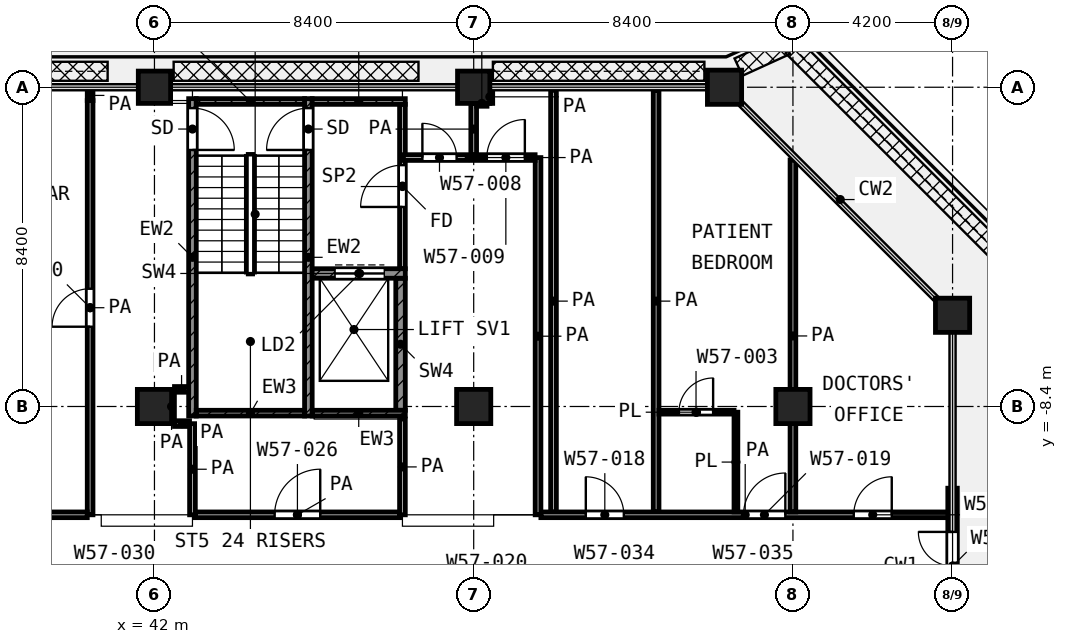
"""IFC4 building model, lengths in metres.
Left out: names, types, materials, properties, quantities, classifications, styles, units other than length and angle.
Written with IfcOpenShell. Run it as: python <this file> out.ifc"""

import sys

from ifc_helpers import new_model, si_unit, direction, frame, frame_2d, origin, origin_2d, place, context, subcontext, project, spatial, rectangle, extrude, element, fill, save


model = new_model("IFC4")
c1 = context("Model", 3, precision=1e-05, world=origin(), true_north=direction((0.0, 1.0)))
c2 = subcontext(c1, "Body", "Model", "MODEL_VIEW")
j1 = project(units=[si_unit("LENGTHUNIT", "METRE"), si_unit("PLANEANGLEUNIT", "RADIAN")], contexts=[c1])
p1 = place(None, origin())
s1 = spatial("IfcSite", under=j1, at=p1, CompositionType="ELEMENT")
p2 = place(p1, origin())
s2 = spatial("IfcBuilding", under=s1, at=p2, CompositionType="ELEMENT")
p3 = place(p2, frame((0.0, 0.0, 268.4)))
s3 = spatial("IfcBuildingStorey", under=s2, at=p3, CompositionType="ELEMENT", Elevation=268.4)
for number, where, z_axis, x_axis in (
    (1, (42.0, 0.0, 0.0), (0.0, 0.0, 1.0), (1.0, 0.0, 0.0)),
    (2, (50.4, 0.0, 0.0), (0.0, 0.0, 1.0), (1.0, 0.0, 0.0)),
):
    element("IfcColumn", number, at=place(p3, frame(where, z_axis=z_axis, x_axis=x_axis)), inside=s3, PredefinedType="COLUMN", context=c2, shape_type="SweptSolid", body=[
        extrude(rectangle(XDim=0.85, YDim=0.85, at=origin_2d()), origin(), (0.0, 0.0, 1.0), 4.2),
    ])
for number, where, z_axis, x_axis in (
    (3, (57.0, 0.0, 0.0), (0.0, 0.0, 1.0), (1.0, 0.0, 0.0)),
    (4, (63.0, -6.0, 0.0), (0.0, 0.0, 1.0), (1.0, 0.0, 0.0)),
    (5, (42.0, -8.4, 0.0), (0.0, 0.0, 1.0), (1.0, 0.0, 0.0)),
    (6, (50.4, -8.4, 0.0), (0.0, 0.0, 1.0), (1.0, 0.0, 0.0)),
    (7, (58.8, -8.4, 0.0), (0.0, 0.0, 1.0), (1.0, 0.0, 0.0)),
):
    element("IfcColumn", number, at=place(p3, frame(where, z_axis=z_axis, x_axis=x_axis)), inside=s3, PredefinedType="COLUMN", context=c2, shape_type="SweptSolid", body=[
        extrude(rectangle(XDim=0.9, YDim=0.9, at=origin_2d()), origin(), (0.0, 0.0, 1.0), 4.2),
    ])
p4 = place(p3, frame((63.0, -14.65, 0.0), z_axis=(0.0, 0.0, 1.0), x_axis=(0.0, 1.0, 0.0)))
e8 = element("IfcWall", 8, at=p4, inside=s3, PredefinedType="SOLIDWALL", context=c2, shape_type="SweptSolid", body=[
    extrude(rectangle(XDim=4.1, YDim=0.25, at=frame_2d((2.05, 0.0))), origin(), (0.0, 0.0, 1.0), 3.58),
])
p5 = place(p4, frame((1.15, 0.0, 0.0)))
e9 = element("IfcOpeningElement", 9, at=p5, cuts=e8, PredefinedType="OPENING", context=c2, shape_type="SweptSolid", body=[
    extrude(rectangle(XDim=1.8, YDim=2.1, at=frame_2d((0.9, 1.05))), frame((0.0, 0.135, 0.0), z_axis=(0.0, -1.0, 0.0), x_axis=(1.0, 0.0, 0.0)), (0.0, 0.0, 1.0), 0.27),
])
p6 = place(p3, frame((43.0, -8.65, 0.0), z_axis=(0.0, 0.0, 1.0), x_axis=(0.0, 1.0, 0.0)))
e10 = element("IfcWall", 10, at=p6, inside=s3, PredefinedType="SHEAR", context=c2, shape_type="SweptSolid", body=[
    extrude(rectangle(XDim=8.35, YDim=0.2, at=frame_2d((4.175, 0.0))), origin(), (0.0, 0.0, 1.0), 3.7),
])
p7 = place(p6, frame((7.0, 0.0, 0.0)))
e11 = element("IfcOpeningElement", 11, at=p7, cuts=e10, PredefinedType="OPENING", context=c2, shape_type="SweptSolid", body=[
    extrude(rectangle(XDim=1.1, YDim=2.1, at=frame_2d((0.55, 1.05))), frame((0.0, 0.11, 0.0), z_axis=(0.0, -1.0, 0.0), x_axis=(1.0, 0.0, 0.0)), (0.0, 0.0, 1.0), 0.22),
])
p8 = place(p3, frame((46.05, -8.65, 0.0), z_axis=(0.0, 0.0, 1.0), x_axis=(0.0, 1.0, 0.0)))
e12 = element("IfcWall", 12, at=p8, inside=s3, PredefinedType="SHEAR", context=c2, shape_type="SweptSolid", body=[
    extrude(rectangle(XDim=8.35, YDim=0.2, at=frame_2d((4.175, 0.0))), origin(), (0.0, 0.0, 1.0), 3.7),
])
p9 = place(p8, frame((7.0, 0.0, 0.0)))
e13 = element("IfcOpeningElement", 13, at=p9, cuts=e12, PredefinedType="OPENING", context=c2, shape_type="SweptSolid", body=[
    extrude(rectangle(XDim=1.1, YDim=2.1, at=frame_2d((0.55, 1.05))), frame((0.0, 0.11, 0.0), z_axis=(0.0, -1.0, 0.0), x_axis=(1.0, 0.0, 0.0)), (0.0, 0.0, 1.0), 0.22),
])
p10 = place(p3, frame((43.1, -0.375, 0.0), z_axis=(0.0, 0.0, 1.0), x_axis=(1.0, 0.0, 0.0)))
e14 = element("IfcWall", 14, at=p10, inside=s3, PredefinedType="SHEAR", context=c2, shape_type="SweptSolid", body=[
    extrude(rectangle(XDim=2.85, YDim=0.15, at=frame_2d((1.425, 0.0))), origin(), (0.0, 0.0, 1.0), 3.7),
])
p11 = place(p3, frame((46.15, -0.375, 0.0), z_axis=(0.0, 0.0, 1.0), x_axis=(1.0, 0.0, 0.0)))
e15 = element("IfcWall", 15, at=p11, inside=s3, PredefinedType="SHEAR", context=c2, shape_type="SweptSolid", body=[
    extrude(rectangle(XDim=2.45, YDim=0.15, at=frame_2d((1.225, 0.0))), origin(), (0.0, 0.0, 1.0), 3.7),
])
p12 = place(p3, frame((43.1, -8.575, 0.0), z_axis=(0.0, 0.0, 1.0), x_axis=(1.0, 0.0, 0.0)))
e16 = element("IfcWall", 16, at=p12, inside=s3, PredefinedType="SHEAR", context=c2, shape_type="SweptSolid", body=[
    extrude(rectangle(XDim=2.85, YDim=0.15, at=frame_2d((1.425, 0.0))), origin(), (0.0, 0.0, 1.0), 3.7),
])
p13 = place(p3, frame((46.15, -8.575, 0.0), z_axis=(0.0, 0.0, 1.0), x_axis=(1.0, 0.0, 0.0)))
e17 = element("IfcWall", 17, at=p13, inside=s3, PredefinedType="SHEAR", context=c2, shape_type="SweptSolid", body=[
    extrude(rectangle(XDim=2.45, YDim=0.15, at=frame_2d((1.225, 0.0))), origin(), (0.0, 0.0, 1.0), 3.7),
])
p14 = place(p3, frame((46.15, -4.9, 0.0), z_axis=(0.0, 0.0, 1.0), x_axis=(1.0, 0.0, 0.0)))
e18 = element("IfcWall", 18, at=p14, inside=s3, PredefinedType="SHEAR", context=c2, shape_type="SweptSolid", body=[
    extrude(rectangle(XDim=2.45, YDim=0.25, at=frame_2d((1.225, 0.0))), origin(), (0.0, 0.0, 1.0), 3.7),
])
p15 = place(p14, frame((0.6, 0.0, 0.0)))
e19 = element("IfcOpeningElement", 19, at=p15, cuts=e18, PredefinedType="OPENING", context=c2, shape_type="SweptSolid", body=[
    extrude(rectangle(XDim=1.3, YDim=2.1, at=frame_2d((0.65, 1.05))), frame((0.0, 0.135, 0.0), z_axis=(0.0, -1.0, 0.0), x_axis=(1.0, 0.0, 0.0)), (0.0, 0.0, 1.0), 0.27),
])
p16 = place(p3, frame((48.475, -8.5, 0.0), z_axis=(0.0, 0.0, 1.0), x_axis=(0.0, 1.0, 0.0)))
e20 = element("IfcWall", 20, at=p16, inside=s3, PredefinedType="SHEAR", context=c2, shape_type="SweptSolid", body=[
    extrude(rectangle(XDim=3.475, YDim=0.25, at=frame_2d((1.738, 0.0))), origin(), (0.0, 0.0, 1.0), 3.7),
])
p17 = place(p3, frame((48.525, -4.775, 0.0), z_axis=(0.0, 0.0, 1.0), x_axis=(0.0, 1.0, 0.0)))
e21 = element("IfcWall", 21, at=p17, inside=s3, PredefinedType="PARTITIONING", context=c2, shape_type="SweptSolid", body=[
    extrude(rectangle(XDim=4.325, YDim=0.15, at=frame_2d((2.163, 0.0))), origin(), (0.0, 0.0, 1.0), 3.7),
])
p18 = place(p17, frame((1.625, 0.0, 0.0)))
e22 = element("IfcOpeningElement", 22, at=p18, cuts=e21, PredefinedType="OPENING", context=c2, shape_type="SweptSolid", body=[
    extrude(rectangle(XDim=1.1, YDim=2.1, at=frame_2d((0.55, 1.05))), frame((0.0, 0.085, 0.0), z_axis=(0.0, -1.0, 0.0), x_axis=(1.0, 0.0, 0.0)), (0.0, 0.0, 1.0), 0.17),
])
p19 = place(p3, frame((55.275, -8.55, 0.0), z_axis=(0.0, 0.0, 1.0), x_axis=(1.0, 0.0, 0.0)))
e23 = element("IfcWall", 23, at=p19, inside=s3, PredefinedType="PARTITIONING", context=c2, shape_type="SweptSolid", body=[
    extrude(rectangle(XDim=1.975, YDim=0.1, at=frame_2d((0.988, 0.0))), origin(), (0.0, 0.0, 1.0), 3.7),
])
p20 = place(p19, frame((0.525, 0.0, 0.0)))
e24 = element("IfcOpeningElement", 24, at=p20, cuts=e23, PredefinedType="OPENING", context=c2, shape_type="SweptSolid", body=[
    extrude(rectangle(XDim=0.9, YDim=2.1, at=frame_2d((0.45, 1.05))), frame((0.0, 0.06, 0.0), z_axis=(0.0, -1.0, 0.0), x_axis=(1.0, 0.0, 0.0)), (0.0, 0.0, 1.0), 0.12),
])
p21 = place(p3, frame((57.3, -11.175, 0.0), z_axis=(0.0, 0.0, 1.0), x_axis=(0.0, 1.0, 0.0)))
e25 = element("IfcWall", 25, at=p21, inside=s3, PredefinedType="PARTITIONING", context=c2, shape_type="SweptSolid", body=[
    extrude(rectangle(XDim=2.625, YDim=0.1, at=frame_2d((1.312, 0.0))), origin(), (0.0, 0.0, 1.0), 3.7),
])
p22 = place(p3, frame((29.4, -11.25, 0.0), z_axis=(0.0, 0.0, 1.0), x_axis=(1.0, 0.0, 0.0)))
e26 = element("IfcWall", 26, at=p22, inside=s3, PredefinedType="PARTITIONING", context=c2, shape_type="SweptSolid", body=[
    extrude(rectangle(XDim=10.832, YDim=0.15, at=frame_2d((5.416, 0.0))), origin(), (0.0, 0.0, 1.0), 3.7),
])
p23 = place(p22, frame((2.625, 0.0, 0.0)))
e27 = element("IfcOpeningElement", 27, at=p23, cuts=e26, PredefinedType="OPENING", context=c2, shape_type="SweptSolid", body=[
    extrude(rectangle(XDim=1.2, YDim=2.1, at=frame_2d((0.6, 1.05))), frame((0.0, 0.085, 0.0), z_axis=(0.0, -1.0, 0.0), x_axis=(1.0, 0.0, 0.0)), (0.0, 0.0, 1.0), 0.17),
])
p24 = place(p22, frame((4.15, 0.0, 0.0)))
e28 = element("IfcOpeningElement", 28, at=p24, cuts=e26, PredefinedType="OPENING", context=c2, shape_type="SweptSolid", body=[
    extrude(rectangle(XDim=1.2, YDim=2.1, at=frame_2d((0.6, 1.05))), frame((0.0, 0.085, 0.0), z_axis=(0.0, -1.0, 0.0), x_axis=(1.0, 0.0, 0.0)), (0.0, 0.0, 1.0), 0.17),
])
p25 = place(p22, frame((6.15, 0.0, 0.0)))
e29 = element("IfcOpeningElement", 29, at=p25, cuts=e26, PredefinedType="OPENING", context=c2, shape_type="SweptSolid", body=[
    extrude(rectangle(XDim=1.2, YDim=2.1, at=frame_2d((0.6, 1.05))), frame((0.0, 0.085, 0.0), z_axis=(0.0, -1.0, 0.0), x_axis=(1.0, 0.0, 0.0)), (0.0, 0.0, 1.0), 0.17),
])
p26 = place(p3, frame((43.075, -11.25, 0.0), z_axis=(0.0, 0.0, 1.0), x_axis=(1.0, 0.0, 0.0)))
e30 = element("IfcWall", 30, at=p26, inside=s3, PredefinedType="PARTITIONING", context=c2, shape_type="SweptSolid", body=[
    extrude(rectangle(XDim=5.375, YDim=0.15, at=frame_2d((2.688, 0.0))), origin(), (0.0, 0.0, 1.0), 3.7),
])
p27 = place(p26, frame((2.087, 0.0, 0.0)))
e31 = element("IfcOpeningElement", 31, at=p27, cuts=e30, PredefinedType="OPENING", context=c2, shape_type="SweptSolid", body=[
    extrude(rectangle(XDim=1.2, YDim=2.1, at=frame_2d((0.6, 1.05))), frame((0.0, 0.085, 0.0), z_axis=(0.0, -1.0, 0.0), x_axis=(1.0, 0.0, 0.0)), (0.0, 0.0, 1.0), 0.17),
])
p28 = place(p3, frame((52.168, -11.25, 0.0), z_axis=(0.0, 0.0, 1.0), x_axis=(1.0, 0.0, 0.0)))
e32 = element("IfcWall", 32, at=p28, inside=s3, PredefinedType="PARTITIONING", context=c2, shape_type="SweptSolid", body=[
    extrude(rectangle(XDim=10.752, YDim=0.15, at=frame_2d((5.376, 0.0))), origin(), (0.0, 0.0, 1.0), 3.7),
])
p29 = place(p28, frame((5.332, 0.0, 0.0)))
e33 = element("IfcOpeningElement", 33, at=p29, cuts=e32, PredefinedType="OPENING", context=c2, shape_type="SweptSolid", body=[
    extrude(rectangle(XDim=1.1, YDim=2.1, at=frame_2d((0.55, 1.05))), frame((0.0, 0.085, 0.0), z_axis=(0.0, -1.0, 0.0), x_axis=(1.0, 0.0, 0.0)), (0.0, 0.0, 1.0), 0.17),
])
p30 = place(p28, frame((8.232, 0.0, 0.0)))
e34 = element("IfcOpeningElement", 34, at=p30, cuts=e32, PredefinedType="OPENING", context=c2, shape_type="SweptSolid", body=[
    extrude(rectangle(XDim=1.0, YDim=2.1, at=frame_2d((0.5, 1.05))), frame((0.0, 0.085, 0.0), z_axis=(0.0, -1.0, 0.0), x_axis=(1.0, 0.0, 0.0)), (0.0, 0.0, 1.0), 0.17),
])
p31 = place(p28, frame((1.182, 0.0, 0.0)))
e35 = element("IfcOpeningElement", 35, at=p31, cuts=e32, PredefinedType="OPENING", context=c2, shape_type="SweptSolid", body=[
    extrude(rectangle(XDim=1.0, YDim=2.1, at=frame_2d((0.5, 1.05))), frame((0.0, 0.085, 0.0), z_axis=(0.0, -1.0, 0.0), x_axis=(1.0, 0.0, 0.0)), (0.0, 0.0, 1.0), 0.17),
])
p32 = place(p3, frame((42.527, -8.85, 0.0), z_axis=(0.0, 0.0, 1.0), x_axis=(1.0, 0.0, 0.0)))
e36 = element("IfcWall", 36, at=p32, inside=s3, PredefinedType="PARTITIONING", context=c2, shape_type="SweptSolid", body=[
    extrude(rectangle(XDim=0.396, YDim=0.15, at=frame_2d((0.198, 0.0))), origin(), (0.0, 0.0, 1.0), 3.7),
])
p33 = place(p3, frame((42.527, -7.95, 0.0), z_axis=(0.0, 0.0, 1.0), x_axis=(1.0, 0.0, 0.0)))
e37 = element("IfcWall", 37, at=p33, inside=s3, PredefinedType="PARTITIONING", context=c2, shape_type="SweptSolid", body=[
    extrude(rectangle(XDim=0.373, YDim=0.15, at=frame_2d((0.187, 0.0))), origin(), (0.0, 0.0, 1.0), 3.7),
])
p34 = place(p3, frame((48.55, -1.85, 0.0), z_axis=(0.0, 0.0, 1.0), x_axis=(1.0, 0.0, 0.0)))
e38 = element("IfcWall", 38, at=p34, inside=s3, PredefinedType="PARTITIONING", context=c2, shape_type="SweptSolid", body=[
    extrude(rectangle(XDim=3.466, YDim=0.15, at=frame_2d((1.733, 0.0))), origin(), (0.0, 0.0, 1.0), 3.7),
])
p35 = place(p34, frame((0.5, 0.0, 0.0)))
e39 = element("IfcOpeningElement", 39, at=p35, cuts=e38, PredefinedType="OPENING", context=c2, shape_type="SweptSolid", body=[
    extrude(rectangle(XDim=0.9, YDim=2.1, at=frame_2d((0.45, 1.05))), frame((0.0, 0.085, 0.0), z_axis=(0.0, -1.0, 0.0), x_axis=(1.0, 0.0, 0.0)), (0.0, 0.0, 1.0), 0.17),
])
p36 = place(p34, frame((2.196, 0.0, 0.0)))
e40 = element("IfcOpeningElement", 40, at=p36, cuts=e38, PredefinedType="OPENING", context=c2, shape_type="SweptSolid", body=[
    extrude(rectangle(XDim=1.0, YDim=2.1, at=frame_2d((0.5, 1.05))), frame((0.0, 0.085, 0.0), z_axis=(0.0, -1.0, 0.0), x_axis=(1.0, 0.0, 0.0)), (0.0, 0.0, 1.0), 0.17),
])
p37 = place(p3, frame((50.477, -0.425, 0.0), z_axis=(0.0, 0.0, 1.0), x_axis=(1.0, 0.0, 0.0)))
e41 = element("IfcWall", 41, at=p37, inside=s3, PredefinedType="PARTITIONING", context=c2, shape_type="SweptSolid", body=[
    extrude(rectangle(XDim=0.273, YDim=0.15, at=frame_2d((0.136, 0.0))), origin(), (0.0, 0.0, 1.0), 3.7),
])
p38 = place(p3, frame((40.307, -11.25, 0.0), z_axis=(0.0, 0.0, 1.0), x_axis=(0.0, 1.0, 0.0)))
e42 = element("IfcWall", 42, at=p38, inside=s3, PredefinedType="PARTITIONING", context=c2, shape_type="SweptSolid", body=[
    extrude(rectangle(XDim=10.898, YDim=0.15, at=frame_2d((5.449, 0.0))), origin(), (0.0, 0.0, 1.0), 3.7),
])
p39 = place(p38, frame((4.949, 0.0, 0.0)))
e43 = element("IfcOpeningElement", 43, at=p39, cuts=e42, PredefinedType="OPENING", context=c2, shape_type="SweptSolid", body=[
    extrude(rectangle(XDim=1.0, YDim=2.1, at=frame_2d((0.5, 1.05))), frame((0.0, 0.085, 0.0), z_axis=(0.0, -1.0, 0.0), x_axis=(1.0, 0.0, 0.0)), (0.0, 0.0, 1.0), 0.17),
])
p40 = place(p3, frame((40.307, -0.35, 0.0), z_axis=(0.0, 0.0, 1.0), x_axis=(0.0, 1.0, 0.0)))
e44 = element("IfcWall", 44, at=p40, inside=s3, PredefinedType="PARTITIONING", context=c2, shape_type="SweptSolid", body=[
    extrude(rectangle(XDim=0.27, YDim=0.15, at=frame_2d((0.135, 0.0))), origin(), (0.0, 0.0, 1.0), 3.7),
])
p41 = place(p3, frame((42.45, -8.849, 0.0), z_axis=(0.0, 0.0, 1.0), x_axis=(0.0, 1.0, 0.0)))
e45 = element("IfcWall", 45, at=p41, inside=s3, PredefinedType="PARTITIONING", context=c2, shape_type="SweptSolid", body=[
    extrude(rectangle(XDim=0.897, YDim=0.15, at=frame_2d((0.449, 0.0))), origin(), (0.0, 0.0, 1.0), 3.7),
])
p42 = place(p3, frame((43.0, -11.25, 0.0), z_axis=(0.0, 0.0, 1.0), x_axis=(0.0, 1.0, 0.0)))
e46 = element("IfcWall", 46, at=p42, inside=s3, PredefinedType="PARTITIONING", context=c2, shape_type="SweptSolid", body=[
    extrude(rectangle(XDim=2.398, YDim=0.15, at=frame_2d((1.199, 0.0))), origin(), (0.0, 0.0, 1.0), 3.7),
])
p43 = place(p3, frame((48.525, -11.25, 0.0), z_axis=(0.0, 0.0, 1.0), x_axis=(0.0, 1.0, 0.0)))
e47 = element("IfcWall", 47, at=p43, inside=s3, PredefinedType="PARTITIONING", context=c2, shape_type="SweptSolid", body=[
    extrude(rectangle(XDim=2.52, YDim=0.15, at=frame_2d((1.26, 0.0))), origin(), (0.0, 0.0, 1.0), 3.7),
])
p44 = place(p3, frame((50.4, -1.775, 0.0), z_axis=(0.0, 0.0, 1.0), x_axis=(0.0, 1.0, 0.0)))
e48 = element("IfcWall", 48, at=p44, inside=s3, PredefinedType="PARTITIONING", context=c2, shape_type="SweptSolid", body=[
    extrude(rectangle(XDim=1.348, YDim=0.15, at=frame_2d((0.674, 0.0))), origin(), (0.0, 0.0, 1.0), 3.7),
])
p45 = place(p3, frame((50.825, -0.425, 0.0), z_axis=(0.0, 0.0, 1.0), x_axis=(0.0, 1.0, 0.0)))
e49 = element("IfcWall", 49, at=p45, inside=s3, PredefinedType="PARTITIONING", context=c2, shape_type="SweptSolid", body=[
    extrude(rectangle(XDim=0.345, YDim=0.15, at=frame_2d((0.172, 0.0))), origin(), (0.0, 0.0, 1.0), 3.7),
])
p46 = place(p3, frame((52.093, -11.25, 0.0), z_axis=(0.0, 0.0, 1.0), x_axis=(0.0, 1.0, 0.0)))
e50 = element("IfcWall", 50, at=p46, inside=s3, PredefinedType="PARTITIONING", context=c2, shape_type="SweptSolid", body=[
    extrude(rectangle(XDim=9.399, YDim=0.15, at=frame_2d((4.699, 0.0))), origin(), (0.0, 0.0, 1.0), 3.7),
])
for number, where, z_axis, x_axis in (
    (51, (52.5, -11.175, 0.0), (0.0, 0.0, 1.0), (0.0, 1.0, 0.0)),
    (52, (55.2, -11.175, 0.0), (0.0, 0.0, 1.0), (0.0, 1.0, 0.0)),
):
    element("IfcWall", number, at=place(p3, frame(where, z_axis=z_axis, x_axis=x_axis)), inside=s3, PredefinedType="PARTITIONING", context=c2, shape_type="SweptSolid", body=[
        extrude(rectangle(XDim=11.095, YDim=0.15, at=frame_2d((5.547, 0.0))), origin(), (0.0, 0.0, 1.0), 3.7),
    ])
p47 = place(p3, frame((58.8, -11.175, 0.0), z_axis=(0.0, 0.0, 1.0), x_axis=(0.0, 1.0, 0.0)))
e53 = element("IfcWall", 53, at=p47, inside=s3, PredefinedType="PARTITIONING", context=c2, shape_type="SweptSolid", body=[
    extrude(rectangle(XDim=9.262, YDim=0.15, at=frame_2d((4.631, 0.0))), origin(), (0.0, 0.0, 1.0), 3.7),
])
p48 = place(p5, origin())
e54 = element("IfcDoor", 54, at=p48, inside=s3, OperationType="DOUBLE_DOOR_SINGLE_SWING", PredefinedType="DOOR", context=c2, shape_type="SweptSolid", body=[
    extrude(rectangle(XDim=1.8, YDim=2.1, at=frame_2d((0.9, 1.05))), frame((0.0, 0.025, 0.0), z_axis=(0.0, -1.0, 0.0), x_axis=(1.0, 0.0, 0.0)), (0.0, 0.0, 1.0), 0.05),
])
fill(e9, e54)
p49 = place(p7, frame((1.1, 0.0, 0.0), z_axis=(0.0, 0.0, 1.0), x_axis=(-1.0, 0.0, 0.0)))
e55 = element("IfcDoor", 55, at=p49, inside=s3, OperationType="SINGLE_SWING_LEFT", PredefinedType="DOOR", context=c2, shape_type="SweptSolid", body=[
    extrude(rectangle(XDim=1.1, YDim=2.1, at=frame_2d((0.55, 1.05))), frame((0.0, 0.025, 0.0), z_axis=(0.0, -1.0, 0.0), x_axis=(1.0, 0.0, 0.0)), (0.0, 0.0, 1.0), 0.05),
])
fill(e11, e55)
p50 = place(p9, origin())
e56 = element("IfcDoor", 56, at=p50, inside=s3, OperationType="SINGLE_SWING_LEFT", PredefinedType="DOOR", context=c2, shape_type="SweptSolid", body=[
    extrude(rectangle(XDim=1.1, YDim=2.1, at=frame_2d((0.55, 1.05))), frame((0.0, 0.025, 0.0), z_axis=(0.0, -1.0, 0.0), x_axis=(1.0, 0.0, 0.0)), (0.0, 0.0, 1.0), 0.05),
])
fill(e13, e56)
p51 = place(p15, origin())
e57 = element("IfcDoor", 57, at=p51, inside=s3, OperationType="DOUBLE_DOOR_SLIDING", PredefinedType="DOOR", context=c2, shape_type="SweptSolid", body=[
    extrude(rectangle(XDim=1.3, YDim=2.1, at=frame_2d((0.65, 1.05))), frame((0.0, 0.025, 0.0), z_axis=(0.0, -1.0, 0.0), x_axis=(1.0, 0.0, 0.0)), (0.0, 0.0, 1.0), 0.05),
])
fill(e19, e57)
p52 = place(p18, origin())
e58 = element("IfcDoor", 58, at=p52, inside=s3, OperationType="SINGLE_SWING_LEFT", PredefinedType="DOOR", context=c2, shape_type="SweptSolid", body=[
    extrude(rectangle(XDim=1.1, YDim=2.1, at=frame_2d((0.55, 1.05))), frame((0.0, 0.025, 0.0), z_axis=(0.0, -1.0, 0.0), x_axis=(1.0, 0.0, 0.0)), (0.0, 0.0, 1.0), 0.05),
])
fill(e22, e58)
p53 = place(p39, origin())
e59 = element("IfcDoor", 59, at=p53, inside=s3, OperationType="SINGLE_SWING_LEFT", PredefinedType="DOOR", context=c2, shape_type="SweptSolid", body=[
    extrude(rectangle(XDim=1.0, YDim=2.1, at=frame_2d((0.5, 1.05))), frame((0.0, 0.025, 0.0), z_axis=(0.0, -1.0, 0.0), x_axis=(1.0, 0.0, 0.0)), (0.0, 0.0, 1.0), 0.05),
])
fill(e43, e59)
p54 = place(p27, origin())
e60 = element("IfcDoor", 60, at=p54, inside=s3, OperationType="SINGLE_SWING_RIGHT", PredefinedType="DOOR", context=c2, shape_type="SweptSolid", body=[
    extrude(rectangle(XDim=1.2, YDim=2.1, at=frame_2d((0.6, 1.05))), frame((0.0, 0.025, 0.0), z_axis=(0.0, -1.0, 0.0), x_axis=(1.0, 0.0, 0.0)), (0.0, 0.0, 1.0), 0.05),
])
fill(e31, e60)
p55 = place(p29, origin())
e61 = element("IfcDoor", 61, at=p55, inside=s3, OperationType="SINGLE_SWING_RIGHT", PredefinedType="DOOR", context=c2, shape_type="SweptSolid", body=[
    extrude(rectangle(XDim=1.1, YDim=2.1, at=frame_2d((0.55, 1.05))), frame((0.0, 0.025, 0.0), z_axis=(0.0, -1.0, 0.0), x_axis=(1.0, 0.0, 0.0)), (0.0, 0.0, 1.0), 0.05),
])
fill(e33, e61)
p56 = place(p20, origin())
e62 = element("IfcDoor", 62, at=p56, inside=s3, OperationType="SINGLE_SWING_RIGHT", PredefinedType="DOOR", context=c2, shape_type="SweptSolid", body=[
    extrude(rectangle(XDim=0.9, YDim=2.1, at=frame_2d((0.45, 1.05))), frame((0.0, 0.025, 0.0), z_axis=(0.0, -1.0, 0.0), x_axis=(1.0, 0.0, 0.0)), (0.0, 0.0, 1.0), 0.05),
])
fill(e24, e62)
p57 = place(p30, origin())
e63 = element("IfcDoor", 63, at=p57, inside=s3, OperationType="SINGLE_SWING_RIGHT", PredefinedType="DOOR", context=c2, shape_type="SweptSolid", body=[
    extrude(rectangle(XDim=1.0, YDim=2.1, at=frame_2d((0.5, 1.05))), frame((0.0, 0.025, 0.0), z_axis=(0.0, -1.0, 0.0), x_axis=(1.0, 0.0, 0.0)), (0.0, 0.0, 1.0), 0.05),
])
fill(e34, e63)
p58 = place(p35, origin())
e64 = element("IfcDoor", 64, at=p58, inside=s3, OperationType="SINGLE_SWING_LEFT", PredefinedType="DOOR", context=c2, shape_type="SweptSolid", body=[
    extrude(rectangle(XDim=0.9, YDim=2.1, at=frame_2d((0.45, 1.05))), frame((0.0, 0.025, 0.0), z_axis=(0.0, -1.0, 0.0), x_axis=(1.0, 0.0, 0.0)), (0.0, 0.0, 1.0), 0.05),
])
fill(e39, e64)
p59 = place(p36, origin())
e65 = element("IfcDoor", 65, at=p59, inside=s3, OperationType="SINGLE_SWING_RIGHT", PredefinedType="DOOR", context=c2, shape_type="SweptSolid", body=[
    extrude(rectangle(XDim=1.0, YDim=2.1, at=frame_2d((0.5, 1.05))), frame((0.0, 0.025, 0.0), z_axis=(0.0, -1.0, 0.0), x_axis=(1.0, 0.0, 0.0)), (0.0, 0.0, 1.0), 0.05),
])
fill(e40, e65)
p60 = place(p31, origin())
e66 = element("IfcDoor", 66, at=p60, inside=s3, OperationType="SINGLE_SWING_LEFT", PredefinedType="DOOR", context=c2, shape_type="SweptSolid", body=[
    extrude(rectangle(XDim=1.0, YDim=2.1, at=frame_2d((0.5, 1.05))), frame((0.0, 0.025, 0.0), z_axis=(0.0, -1.0, 0.0), x_axis=(1.0, 0.0, 0.0)), (0.0, 0.0, 1.0), 0.05),
])
fill(e35, e66)
save(model, sys.argv[1])
